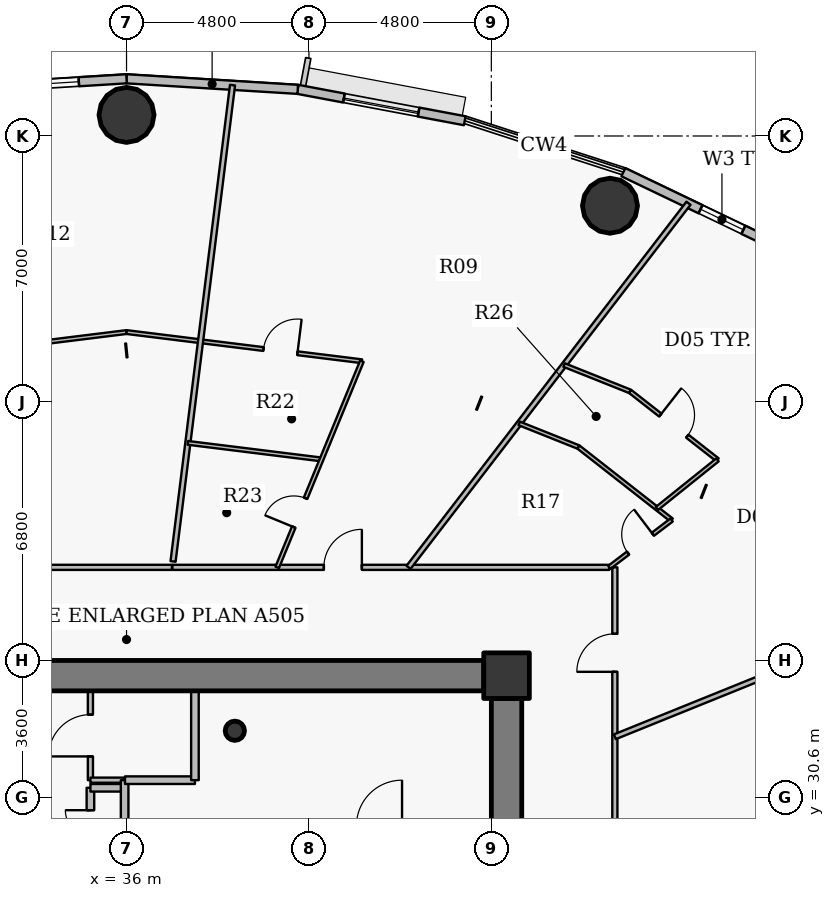
"""IFC4 building model, lengths in metres.
Left out: names, types, materials, properties, quantities, classifications, styles, units other than length and angle.
Written with IfcOpenShell. Run it as: python <this file> out.ifc"""

import sys

from ifc_helpers import new_model, si_unit, direction, frame, frame_2d, origin, origin_2d, place, context, subcontext, project, spatial, rectangle, hollow_circle, extrude, source, transform, mapped, element, fill, save


model = new_model("IFC4")
c1 = context("Model", 3, precision=1e-05, world=origin(), true_north=direction((0.0, 1.0)))
c2 = subcontext(c1, "Body", "Model", "MODEL_VIEW")
j1 = project(units=[si_unit("LENGTHUNIT", "METRE"), si_unit("PLANEANGLEUNIT", "RADIAN")], contexts=[c1])
p1 = place(None, origin())
s1 = spatial("IfcSite", under=j1, at=p1, CompositionType="ELEMENT")
p2 = place(p1, origin())
s2 = spatial("IfcBuilding", under=s1, at=p2, CompositionType="ELEMENT")
p3 = place(p2, frame((0.0, 0.0, 97.2)))
s3 = spatial("IfcBuildingStorey", under=s2, at=p3, CompositionType="ELEMENT", Elevation=97.2)
p4 = place(p3, frame((46.0, 33.8, 0.0), z_axis=(0.0, 0.0, 1.0), x_axis=(1.0, 0.0, 0.0)))
e1 = element("IfcColumn", 1, at=p4, inside=s3, PredefinedType="COLUMN", context=c2, shape_type="SweptSolid", body=[
    extrude(rectangle(XDim=1.2, YDim=1.2, at=origin_2d()), origin(), (0.0, 0.0, 1.0), 3.75),
])
p5 = place(p3, frame((38.85, 32.35, 0.0), z_axis=(0.0, 0.0, 1.0), x_axis=(1.0, 0.0, 0.0)))
e2 = element("IfcColumn", 2, at=p5, inside=s3, PredefinedType="COLUMN", context=c2, shape_type="SweptSolid", body=[
    extrude(hollow_circle(Radius=0.254, WallThickness=0.02, at=origin_2d()), origin(), (0.0, 0.0, 1.0), 3.75),
])
p6 = place(p3, frame((26.6, 33.8, 0.0), z_axis=(0.0, 0.0, 1.0), x_axis=(1.0, 0.0, 0.0)))
e3 = element("IfcWall", 3, at=p6, inside=s3, PredefinedType="SHEAR", context=c2, shape_type="SweptSolid", body=[
    extrude(rectangle(XDim=18.8, YDim=0.8, at=frame_2d((9.4, 0.0))), origin(), (0.0, 0.0, 1.0), 2.95),
])
p7 = place(p3, frame((46.0, 33.2, 0.0), z_axis=(0.0, 0.0, 1.0), x_axis=(0.0, -1.0, 0.0)))
e4 = element("IfcWall", 4, at=p7, inside=s3, PredefinedType="SHEAR", context=c2, shape_type="SweptSolid", body=[
    extrude(rectangle(XDim=12.4, YDim=0.8, at=frame_2d((6.2, 0.0))), origin(), (0.0, 0.0, 1.0), 2.95),
])
p8 = place(p7, frame((5.79, 0.0, 0.0)))
e5 = element("IfcOpeningElement", 5, at=p8, cuts=e4, PredefinedType="OPENING", context=c2, shape_type="SweptSolid", body=[
    extrude(rectangle(XDim=0.82, YDim=2.1, at=origin_2d()), frame((0.41, 0.41, 1.05), z_axis=(0.0, -1.0, 0.0), x_axis=(1.0, 0.0, 0.0)), (0.0, 0.0, 1.0), 0.82),
])
for number, where, z_axis, x_axis in (
    (6, (48.722, 46.165, 0.0), (0.0, 0.0, 1.0), (1.0, 0.0, 0.0)),
    (7, (36.0, 48.555, 0.0), (0.0, 0.0, 1.0), (1.0, 0.0, 0.0)),
):
    element("IfcColumn", number, at=place(p3, frame(where, z_axis=z_axis, x_axis=x_axis)), inside=s3, PredefinedType="COLUMN", context=c2, shape_type="SweptSolid", body=[
        extrude(hollow_circle(Radius=0.725, WallThickness=0.042, at=origin_2d()), origin(), (0.0, 0.0, 1.0), 3.75),
    ])
p9 = place(p3, frame((49.074, 47.047, 0.0), z_axis=(0.0, 0.0, 1.0), x_axis=(0.901589935876, -0.432591709962, 0.0)))
e8 = element("IfcWall", 8, at=p9, inside=s3, PredefinedType="SOLIDWALL", context=c2, shape_type="SweptSolid", body=[
    extrude(rectangle(XDim=4.272, YDim=0.24, at=frame_2d((2.136, 0.0))), origin(), (0.0, 0.0, 1.0), 3.5),
])
p10 = place(p9, frame((2.252, 0.0, 0.9)))
e9 = element("IfcOpeningElement", 9, at=p10, cuts=e8, PredefinedType="OPENING", context=c2, shape_type="SweptSolid", body=[
    extrude(rectangle(XDim=1.25, YDim=1.65, at=origin_2d()), frame((0.625, 0.13, 0.825), z_axis=(0.0, -1.0, 0.0), x_axis=(1.0, 0.0, 0.0)), (0.0, 0.0, 1.0), 0.26),
])
p11 = place(p3, frame((40.506, 49.227, 0.0), z_axis=(0.0, 0.0, 1.0), x_axis=(0.982789252177, -0.184730305596, 0.0)))
e10 = element("IfcWall", 10, at=p11, inside=s3, PredefinedType="SOLIDWALL", context=c2, shape_type="SweptSolid", body=[
    extrude(rectangle(XDim=4.471, YDim=0.24, at=frame_2d((2.235, 0.0))), origin(), (0.0, 0.0, 1.0), 3.5),
])
p12 = place(p11, frame((1.236, 0.0, 0.9)))
e11 = element("IfcOpeningElement", 11, at=p12, cuts=e10, PredefinedType="OPENING", context=c2, shape_type="SweptSolid", body=[
    extrude(rectangle(XDim=2.0, YDim=1.75, at=origin_2d()), frame((1.0, 0.13, 0.875), z_axis=(0.0, -1.0, 0.0), x_axis=(1.0, 0.0, 0.0)), (0.0, 0.0, 1.0), 0.26),
])
p13 = place(p3, frame((36.0, 49.505, 0.0), z_axis=(0.0, 0.0, 1.0), x_axis=(0.998107531589, -0.061492726276, 0.0)))
e12 = element("IfcWall", 12, at=p13, inside=s3, PredefinedType="SOLIDWALL", context=c2, shape_type="SweptSolid", body=[
    extrude(rectangle(XDim=4.514, YDim=0.24, at=frame_2d((2.257, 0.0))), origin(), (0.0, 0.0, 1.0), 3.5),
])
p14 = place(p3, frame((31.494, 49.227, 0.0), z_axis=(0.0, 0.0, 1.0), x_axis=(0.998107531589, 0.061492726276, 0.0)))
e13 = element("IfcWall", 13, at=p14, inside=s3, PredefinedType="SOLIDWALL", context=c2, shape_type="SweptSolid", body=[
    extrude(rectangle(XDim=4.514, YDim=0.24, at=frame_2d((2.257, 0.0))), origin(), (0.0, 0.0, 1.0), 3.5),
])
p15 = place(p14, frame((1.257, 0.0, 0.9)))
e14 = element("IfcOpeningElement", 14, at=p15, cuts=e13, PredefinedType="OPENING", context=c2, shape_type="SweptSolid", body=[
    extrude(rectangle(XDim=2.0, YDim=1.75, at=origin_2d()), frame((1.0, 0.13, 0.875), z_axis=(0.0, -1.0, 0.0), x_axis=(1.0, 0.0, 0.0)), (0.0, 0.0, 1.0), 0.26),
])
p16 = place(p3, frame((31.416, 42.272, 0.0), z_axis=(0.0, 0.0, 1.0), x_axis=(0.992393726446, 0.12310439355, 0.0)))
e15 = element("IfcWall", 15, at=p16, inside=s3, PredefinedType="PARTITIONING", context=c2, shape_type="SweptSolid", body=[
    extrude(rectangle(XDim=4.619, YDim=0.1, at=frame_2d((2.31, 0.0))), origin(), (0.0, 0.0, 1.0), 2.935),
])
p17 = place(p3, frame((35.05, 27.25, 0.0), z_axis=(0.0, 0.0, 1.0), x_axis=(0.0, 1.0, 0.0)))
e16 = element("IfcWall", 16, at=p17, inside=s3, PredefinedType="PARTITIONING", context=c2, shape_type="SweptSolid", body=[
    extrude(rectangle(XDim=3.6, YDim=0.2, at=frame_2d((1.8, 0.0))), origin(), (0.0, 0.0, 1.0), 3.5),
])
p18 = place(p17, frame((0.59, 0.0, 0.0)))
e17 = element("IfcOpeningElement", 17, at=p18, cuts=e16, PredefinedType="OPENING", context=c2, shape_type="SweptSolid", body=[
    extrude(rectangle(XDim=0.66, YDim=2.05, at=origin_2d()), frame((0.33, 0.11, 1.025), z_axis=(0.0, -1.0, 0.0), x_axis=(1.0, 0.0, 0.0)), (0.0, 0.0, 1.0), 0.22),
])
p19 = place(p17, frame((2.35, 0.0, 0.0)))
e18 = element("IfcOpeningElement", 18, at=p19, cuts=e16, PredefinedType="OPENING", context=c2, shape_type="SweptSolid", body=[
    extrude(rectangle(XDim=0.66, YDim=2.05, at=origin_2d()), frame((0.33, 0.11, 1.025), z_axis=(0.0, -1.0, 0.0), x_axis=(1.0, 0.0, 0.0)), (0.0, 0.0, 1.0), 0.22),
])
p20 = place(p3, frame((35.05, 30.85, 0.0), z_axis=(0.0, 0.0, 1.0), x_axis=(1.0, 0.0, 0.0)))
e19 = element("IfcWall", 19, at=p20, inside=s3, PredefinedType="PARTITIONING", context=c2, shape_type="SweptSolid", body=[
    extrude(rectangle(XDim=0.9, YDim=0.2, at=frame_2d((0.45, 0.0))), origin(), (0.0, 0.0, 1.0), 3.5),
])
p21 = place(p3, frame((35.05, 31.05, 0.0), z_axis=(0.0, 0.0, 1.0), x_axis=(0.0, 1.0, 0.0)))
e20 = element("IfcWall", 20, at=p21, inside=s3, PredefinedType="PARTITIONING", context=c2, shape_type="SweptSolid", body=[
    extrude(rectangle(XDim=2.35, YDim=0.135, at=frame_2d((1.175, 0.0))), origin(), (0.0, 0.0, 1.0), 3.085),
])
p22 = place(p21, frame((0.625, 0.0, 0.0)))
e21 = element("IfcOpeningElement", 21, at=p22, cuts=e20, PredefinedType="OPENING", context=c2, shape_type="SweptSolid", body=[
    extrude(rectangle(XDim=1.1, YDim=2.15, at=origin_2d()), frame((0.55, 0.078, 1.075), z_axis=(0.0, -1.0, 0.0), x_axis=(1.0, 0.0, 0.0)), (0.0, 0.0, 1.0), 0.155),
])
p23 = place(p3, frame((35.05, 31.05, 0.0), z_axis=(0.0, 0.0, 1.0), x_axis=(1.0, 0.0, 0.0)))
e22 = element("IfcWall", 22, at=p23, inside=s3, PredefinedType="PARTITIONING", context=c2, shape_type="SweptSolid", body=[
    extrude(rectangle(XDim=0.9, YDim=0.135, at=frame_2d((0.45, 0.0))), origin(), (0.0, 0.0, 1.0), 3.5),
])
p24 = place(p3, frame((35.95, 27.25, 0.0), z_axis=(0.0, 0.0, 1.0), x_axis=(0.0, 1.0, 0.0)))
e23 = element("IfcWall", 23, at=p24, inside=s3, PredefinedType="PARTITIONING", context=c2, shape_type="SweptSolid", body=[
    extrude(rectangle(XDim=3.8, YDim=0.2, at=frame_2d((1.9, 0.0))), origin(), (0.0, 0.0, 1.0), 3.5),
])
p25 = place(p3, frame((35.96, 31.05, 0.0), z_axis=(0.0, 0.0, 1.0), x_axis=(1.0, 0.0, 0.0)))
e24 = element("IfcWall", 24, at=p25, inside=s3, PredefinedType="PARTITIONING", context=c2, shape_type="SweptSolid", body=[
    extrude(rectangle(XDim=1.84, YDim=0.2, at=frame_2d((0.92, 0.0))), origin(), (0.0, 0.0, 1.0), 3.5),
])
p26 = place(p3, frame((36.0, 42.841, 0.0), z_axis=(0.0, 0.0, 1.0), x_axis=(0.992393593066, -0.123105468776, 0.0)))
e25 = element("IfcWall", 25, at=p26, inside=s3, PredefinedType="PARTITIONING", context=c2, shape_type="SweptSolid", body=[
    extrude(rectangle(XDim=6.241, YDim=0.1, at=frame_2d((3.121, 0.0))), origin(), (0.0, 0.0, 1.0), 2.935),
])
p27 = place(p26, frame((3.632, 0.0, 0.0)))
e26 = element("IfcOpeningElement", 26, at=p27, cuts=e25, PredefinedType="OPENING", context=c2, shape_type="SweptSolid", body=[
    extrude(rectangle(XDim=0.9, YDim=2.1, at=origin_2d()), frame((0.45, 0.06, 1.05), z_axis=(0.0, -1.0, 0.0), x_axis=(1.0, 0.0, 0.0)), (0.0, 0.0, 1.0), 0.12),
])
p28 = place(p3, frame((37.205, 36.65, 0.0), z_axis=(0.0, 0.0, 1.0), x_axis=(1.0, 0.0, 0.0)))
e27 = element("IfcWall", 27, at=p28, inside=s3, PredefinedType="PARTITIONING", context=c2, shape_type="SweptSolid", body=[
    extrude(rectangle(XDim=11.499, YDim=0.135, at=frame_2d((5.75, 0.0))), origin(), (0.0, 0.0, 1.0), 2.935),
])
p29 = place(p28, frame((3.988, 0.0, 0.0)))
e28 = element("IfcOpeningElement", 28, at=p29, cuts=e27, PredefinedType="OPENING", context=c2, shape_type="SweptSolid", body=[
    extrude(rectangle(XDim=1.0, YDim=2.15, at=origin_2d()), frame((0.5, 0.078, 1.075), z_axis=(0.0, -1.0, 0.0), x_axis=(1.0, 0.0, 0.0)), (0.0, 0.0, 1.0), 0.155),
])
p30 = place(p3, frame((37.224, 36.805, 0.0), z_axis=(0.0, 0.0, 1.0), x_axis=(0.123906262398, 0.992293927291, 0.0)))
e29 = element("IfcWall", 29, at=p30, inside=s3, PredefinedType="PARTITIONING", context=c2, shape_type="SweptSolid", body=[
    extrude(rectangle(XDim=12.63, YDim=0.135, at=frame_2d((6.315, 0.0))), origin(), (0.0, 0.0, 1.0), 2.935),
])
p31 = place(p3, frame((37.614, 39.925, 0.0), z_axis=(0.0, 0.0, 1.0), x_axis=(0.992397148182, -0.123076806427, 0.0)))
e30 = element("IfcWall", 30, at=p31, inside=s3, PredefinedType="PARTITIONING", context=c2, shape_type="SweptSolid", body=[
    extrude(rectangle(XDim=3.545, YDim=0.1, at=frame_2d((1.772, 0.0))), origin(), (0.0, 0.0, 1.0), 3.5),
])
p32 = place(p3, frame((37.8, 31.05, 0.0), z_axis=(0.0, 0.0, 1.0), x_axis=(0.0, 1.0, 0.0)))
e31 = element("IfcWall", 31, at=p32, inside=s3, PredefinedType="PARTITIONING", context=c2, shape_type="SweptSolid", body=[
    extrude(rectangle(XDim=2.35, YDim=0.2, at=frame_2d((1.175, 0.0))), origin(), (0.0, 0.0, 1.0), 3.085),
])
p33 = place(p3, frame((39.965, 36.65, 0.0), z_axis=(0.0, 0.0, 1.0), x_axis=(0.380069011115, 0.924958132452, 0.0)))
e32 = element("IfcWall", 32, at=p33, inside=s3, PredefinedType="PARTITIONING", context=c2, shape_type="SweptSolid", body=[
    extrude(rectangle(XDim=5.863, YDim=0.1, at=frame_2d((2.931, 0.0))), origin(), (0.0, 0.0, 1.0), 3.5),
])
p34 = place(p33, frame((1.145, 0.0, 0.0)))
e33 = element("IfcOpeningElement", 33, at=p34, cuts=e32, PredefinedType="OPENING", context=c2, shape_type="SweptSolid", body=[
    extrude(rectangle(XDim=0.82, YDim=2.1, at=origin_2d()), frame((0.41, 0.06, 1.05), z_axis=(0.0, -1.0, 0.0), x_axis=(1.0, 0.0, 0.0)), (0.0, 0.0, 1.0), 0.12),
])
p35 = place(p3, frame((43.42, 36.65, 0.0), z_axis=(0.0, 0.0, 1.0), x_axis=(0.609572126114, 0.792730611913, 0.0)))
e34 = element("IfcWall", 34, at=p35, inside=s3, PredefinedType="PARTITIONING", context=c2, shape_type="SweptSolid", body=[
    extrude(rectangle(XDim=12.086, YDim=0.135, at=frame_2d((6.043, 0.0))), origin(), (0.0, 0.0, 1.0), 2.935),
])
p36 = place(p3, frame((46.333, 40.437, 0.0), z_axis=(0.0, 0.0, 1.0), x_axis=(0.928817558248, -0.370537371247, 0.0)))
e35 = element("IfcWall", 35, at=p36, inside=s3, PredefinedType="PARTITIONING", context=c2, shape_type="SweptSolid", body=[
    extrude(rectangle(XDim=1.677, YDim=0.1, at=frame_2d((0.839, 0.0))), origin(), (0.0, 0.0, 1.0), 3.185),
])
p37 = place(p3, frame((47.514, 41.973, 0.0), z_axis=(0.0, 0.0, 1.0), x_axis=(0.928809612726, -0.370557287485, 0.0)))
e36 = element("IfcWall", 36, at=p37, inside=s3, PredefinedType="PARTITIONING", context=c2, shape_type="SweptSolid", body=[
    extrude(rectangle(XDim=1.869, YDim=0.1, at=frame_2d((0.935, 0.0))), origin(), (0.0, 0.0, 1.0), 3.5),
])
p38 = place(p3, frame((47.891, 39.816, 0.0), z_axis=(0.0, 0.0, 1.0), x_axis=(0.787339621997, -0.616519520887, 0.0)))
e37 = element("IfcWall", 37, at=p38, inside=s3, PredefinedType="PARTITIONING", context=c2, shape_type="SweptSolid", body=[
    extrude(rectangle(XDim=3.116, YDim=0.1, at=frame_2d((1.558, 0.0))), origin(), (0.0, 0.0, 1.0), 2.935),
])
p39 = place(p3, frame((48.704, 36.65, 0.0), z_axis=(0.0, 0.0, 1.0), x_axis=(0.796299280247, 0.604902848628, 0.0)))
e38 = element("IfcWall", 38, at=p39, inside=s3, PredefinedType="PARTITIONING", context=c2, shape_type="SweptSolid", body=[
    extrude(rectangle(XDim=2.059, YDim=0.1, at=frame_2d((1.029, 0.0))), origin(), (0.0, 0.0, 1.0), 2.935),
])
p40 = place(p39, frame((0.619, 0.0, 0.0)))
e39 = element("IfcOpeningElement", 39, at=p40, cuts=e38, PredefinedType="OPENING", context=c2, shape_type="SweptSolid", body=[
    extrude(rectangle(XDim=0.82, YDim=2.1, at=origin_2d()), frame((0.41, 0.06, 1.05), z_axis=(0.0, -1.0, 0.0), x_axis=(1.0, 0.0, 0.0)), (0.0, 0.0, 1.0), 0.12),
])
p41 = place(p3, frame((48.85, 17.35, 0.0), z_axis=(0.0, 0.0, 1.0), x_axis=(0.0, 1.0, 0.0)))
e40 = element("IfcWall", 40, at=p41, inside=s3, PredefinedType="PARTITIONING", context=c2, shape_type="SweptSolid", body=[
    extrude(rectangle(XDim=19.3, YDim=0.135, at=frame_2d((9.65, 0.0))), origin(), (0.0, 0.0, 1.0), 2.935),
])
p42 = place(p41, frame((16.551, 0.0, 0.0)))
e41 = element("IfcOpeningElement", 41, at=p42, cuts=e40, PredefinedType="OPENING", context=c2, shape_type="SweptSolid", body=[
    extrude(rectangle(XDim=1.0, YDim=2.15, at=origin_2d()), frame((0.5, 0.078, 1.075), z_axis=(0.0, -1.0, 0.0), x_axis=(1.0, 0.0, 0.0)), (0.0, 0.0, 1.0), 0.155),
])
p43 = place(p41, frame((8.753, 0.0, 0.0)))
e42 = element("IfcOpeningElement", 42, at=p43, cuts=e40, PredefinedType="OPENING", context=c2, shape_type="SweptSolid", body=[
    extrude(rectangle(XDim=1.0, YDim=2.15, at=origin_2d()), frame((0.5, 0.078, 1.075), z_axis=(0.0, -1.0, 0.0), x_axis=(1.0, 0.0, 0.0)), (0.0, 0.0, 1.0), 0.155),
])
p44 = place(p3, frame((48.85, 32.192, 0.0), z_axis=(0.0, 0.0, 1.0), x_axis=(0.927181163505, 0.374613253958, 0.0)))
e43 = element("IfcWall", 43, at=p44, inside=s3, PredefinedType="PARTITIONING", context=c2, shape_type="SweptSolid", body=[
    extrude(rectangle(XDim=13.706, YDim=0.135, at=frame_2d((6.853, 0.0))), origin(), (0.0, 0.0, 1.0), 2.935),
])
p45 = place(p3, frame((49.25, 41.28, 0.0), z_axis=(0.0, 0.0, 1.0), x_axis=(0.787360471536, -0.616492893602, 0.0)))
e44 = element("IfcWall", 44, at=p45, inside=s3, PredefinedType="PARTITIONING", context=c2, shape_type="SweptSolid", body=[
    extrude(rectangle(XDim=2.923, YDim=0.1, at=frame_2d((1.462, 0.0))), origin(), (0.0, 0.0, 1.0), 3.5),
])
p46 = place(p45, frame((1.012, 0.0, 0.0)))
e45 = element("IfcOpeningElement", 45, at=p46, cuts=e44, PredefinedType="OPENING", context=c2, shape_type="SweptSolid", body=[
    extrude(rectangle(XDim=0.9, YDim=2.1, at=origin_2d()), frame((0.45, 0.06, 1.05), z_axis=(0.0, -1.0, 0.0), x_axis=(1.0, 0.0, 0.0)), (0.0, 0.0, 1.0), 0.12),
])
p47 = place(p3, frame((49.956, 38.198, 0.0), z_axis=(0.0, 0.0, 1.0), x_axis=(0.78000622602, 0.625771753413, 0.0)))
e46 = element("IfcWall", 46, at=p47, inside=s3, PredefinedType="PARTITIONING", context=c2, shape_type="SweptSolid", body=[
    extrude(rectangle(XDim=2.045, YDim=0.1, at=frame_2d((1.022, 0.0))), origin(), (0.0, 0.0, 1.0), 3.185),
])
p48 = place(p3, frame((33.533, 36.65, 0.0), z_axis=(0.0, 0.0, 1.0), x_axis=(1.0, 0.0, 0.0)))
e47 = element("IfcWall", 47, at=p48, inside=s3, PredefinedType="PARTITIONING", context=c2, shape_type="SweptSolid", body=[
    extrude(rectangle(XDim=3.662, YDim=0.135, at=frame_2d((1.831, 0.0))), origin(), (0.0, 0.0, 1.0), 2.935),
])
p49 = place(p3, frame((46.4, 34.2, 0.0), z_axis=(0.0, 0.0, 1.0), x_axis=(-1.0, 0.0, 0.0)))
e48 = element("IfcWall", 48, at=p49, inside=s3, PredefinedType="PARTITIONING", context=c2, shape_type="SweptSolid", body=[
    extrude(rectangle(XDim=0.99, YDim=0.135, at=frame_2d((0.495, 0.0))), origin(), (0.0, 0.0, 1.0), 2.935),
])
p50 = place(p3, frame((46.4, 33.21, 0.0), z_axis=(0.0, 0.0, 1.0), x_axis=(0.0, 1.0, 0.0)))
e49 = element("IfcWall", 49, at=p50, inside=s3, PredefinedType="PARTITIONING", context=c2, shape_type="SweptSolid", body=[
    extrude(rectangle(XDim=0.683, YDim=0.135, at=frame_2d((0.341, 0.0))), origin(), (0.0, 0.0, 1.0), 3.5),
])
m1 = source(origin(), c2, "Body", "SweptSolid", [
    extrude(rectangle(XDim=1.25, YDim=1.65, at=origin_2d()), frame((0.625, 0.03, 0.825), z_axis=(0.0, -1.0, 0.0), x_axis=(1.0, 0.0, 0.0)), (0.0, 0.0, 1.0), 0.06),
])
p51 = place(p10, origin())
e50 = element("IfcWindow", 50, at=p51, inside=s3, PartitioningType="SINGLE_PANEL", PredefinedType="WINDOW", context=c2, shape_type="MappedRepresentation", body=[
    mapped(m1, transform((0.0, 0.0, 0.0), x_axis=(1.0, 0.0, 0.0), y_axis=(0.0, 1.0, 0.0), z_axis=(0.0, 0.0, 1.0), scale=1.0)),
])
fill(e9, e50)
m2 = source(origin(), c2, "Body", "SweptSolid", [
    extrude(rectangle(XDim=2.0, YDim=1.75, at=origin_2d()), frame((1.0, 0.03, 0.875), z_axis=(0.0, -1.0, 0.0), x_axis=(1.0, 0.0, 0.0)), (0.0, 0.0, 1.0), 0.06),
])
p52 = place(p12, origin())
e51 = element("IfcWindow", 51, at=p52, inside=s3, PartitioningType="DOUBLE_PANEL_VERTICAL", PredefinedType="WINDOW", context=c2, shape_type="MappedRepresentation", body=[
    mapped(m2, transform((0.0, 0.0, 0.0), x_axis=(1.0, 0.0, 0.0), y_axis=(0.0, 1.0, 0.0), z_axis=(0.0, 0.0, 1.0), scale=1.0)),
])
fill(e11, e51)
p53 = place(p15, origin())
e52 = element("IfcWindow", 52, at=p53, inside=s3, PartitioningType="DOUBLE_PANEL_VERTICAL", PredefinedType="WINDOW", context=c2, shape_type="MappedRepresentation", body=[
    mapped(m2, transform((0.0, 0.0, 0.0), x_axis=(1.0, 0.0, 0.0), y_axis=(0.0, 1.0, 0.0), z_axis=(0.0, 0.0, 1.0), scale=1.0)),
])
fill(e14, e52)
m3 = source(origin(), c2, "Body", "SweptSolid", [
    extrude(rectangle(XDim=1.0, YDim=2.15, at=origin_2d()), frame((0.5, 0.025, 1.075), z_axis=(0.0, -1.0, 0.0), x_axis=(1.0, 0.0, 0.0)), (0.0, 0.0, 1.0), 0.05),
])
p54 = place(p42, origin())
e53 = element("IfcDoor", 53, at=p54, inside=s3, OperationType="SINGLE_SWING_LEFT", PredefinedType="DOOR", context=c2, shape_type="MappedRepresentation", body=[
    mapped(m3, transform((0.0, 0.0, 0.0), x_axis=(1.0, 0.0, 0.0), y_axis=(0.0, 1.0, 0.0), z_axis=(0.0, 0.0, 1.0), scale=1.0)),
])
fill(e41, e53)
m4 = source(origin(), c2, "Body", "SweptSolid", [
    extrude(rectangle(XDim=0.82, YDim=2.1, at=origin_2d()), frame((0.41, 0.025, 1.05), z_axis=(0.0, -1.0, 0.0), x_axis=(1.0, 0.0, 0.0)), (0.0, 0.0, 1.0), 0.05),
])
p55 = place(p40, origin())
e54 = element("IfcDoor", 54, at=p55, inside=s3, OperationType="SINGLE_SWING_RIGHT", PredefinedType="DOOR", context=c2, shape_type="MappedRepresentation", body=[
    mapped(m4, transform((0.0, 0.0, 0.0), x_axis=(1.0, 0.0, 0.0), y_axis=(0.0, 1.0, 0.0), z_axis=(0.0, 0.0, 1.0), scale=1.0)),
])
fill(e39, e54)
m5 = source(origin(), c2, "Body", "SweptSolid", [
    extrude(rectangle(XDim=0.9, YDim=2.1, at=origin_2d()), frame((0.45, 0.025, 1.05), z_axis=(0.0, -1.0, 0.0), x_axis=(1.0, 0.0, 0.0)), (0.0, 0.0, 1.0), 0.05),
])
p56 = place(p46, origin())
e55 = element("IfcDoor", 55, at=p56, inside=s3, OperationType="SINGLE_SWING_LEFT", PredefinedType="DOOR", context=c2, shape_type="MappedRepresentation", body=[
    mapped(m5, transform((0.0, 0.0, 0.0), x_axis=(1.0, 0.0, 0.0), y_axis=(0.0, 1.0, 0.0), z_axis=(0.0, 0.0, 1.0), scale=1.0)),
])
fill(e45, e55)
p57 = place(p29, origin())
e56 = element("IfcDoor", 56, at=p57, inside=s3, OperationType="SINGLE_SWING_RIGHT", PredefinedType="DOOR", context=c2, shape_type="MappedRepresentation", body=[
    mapped(m3, transform((0.0, 0.0, 0.0), x_axis=(1.0, 0.0, 0.0), y_axis=(0.0, 1.0, 0.0), z_axis=(0.0, 0.0, 1.0), scale=1.0)),
])
fill(e28, e56)
p58 = place(p34, origin())
e57 = element("IfcDoor", 57, at=p58, inside=s3, OperationType="SINGLE_SWING_LEFT", PredefinedType="DOOR", context=c2, shape_type="MappedRepresentation", body=[
    mapped(m4, transform((0.0, 0.0, 0.0), x_axis=(1.0, 0.0, 0.0), y_axis=(0.0, 1.0, 0.0), z_axis=(0.0, 0.0, 1.0), scale=1.0)),
])
fill(e33, e57)
p59 = place(p27, origin())
e58 = element("IfcDoor", 58, at=p59, inside=s3, OperationType="SINGLE_SWING_RIGHT", PredefinedType="DOOR", context=c2, shape_type="MappedRepresentation", body=[
    mapped(m5, transform((0.0, 0.0, 0.0), x_axis=(1.0, 0.0, 0.0), y_axis=(0.0, 1.0, 0.0), z_axis=(0.0, 0.0, 1.0), scale=1.0)),
])
fill(e26, e58)
m6 = source(origin(), c2, "Body", "SweptSolid", [
    extrude(rectangle(XDim=0.66, YDim=2.05, at=origin_2d()), frame((0.33, 0.025, 1.025), z_axis=(0.0, -1.0, 0.0), x_axis=(1.0, 0.0, 0.0)), (0.0, 0.0, 1.0), 0.05),
])
p60 = place(p19, origin())
e59 = element("IfcDoor", 59, at=p60, inside=s3, OperationType="SINGLE_SWING_RIGHT", PredefinedType="USERDEFINED", context=c2, shape_type="MappedRepresentation", body=[
    mapped(m6, transform((0.0, 0.0, 0.0), x_axis=(1.0, 0.0, 0.0), y_axis=(0.0, 1.0, 0.0), z_axis=(0.0, 0.0, 1.0), scale=1.0)),
])
fill(e18, e59)
m7 = source(origin(), c2, "Body", "SweptSolid", [
    extrude(rectangle(XDim=1.1, YDim=2.15, at=origin_2d()), frame((0.55, 0.025, 1.075), z_axis=(0.0, -1.0, 0.0), x_axis=(1.0, 0.0, 0.0)), (0.0, 0.0, 1.0), 0.05),
])
p61 = place(p22, origin())
e60 = element("IfcDoor", 60, at=p61, inside=s3, OperationType="SINGLE_SWING_LEFT", PredefinedType="DOOR", context=c2, shape_type="MappedRepresentation", body=[
    mapped(m7, transform((0.0, 0.0, 0.0), x_axis=(1.0, 0.0, 0.0), y_axis=(0.0, 1.0, 0.0), z_axis=(0.0, 0.0, 1.0), scale=1.0)),
])
fill(e21, e60)
save(model, sys.argv[1])
